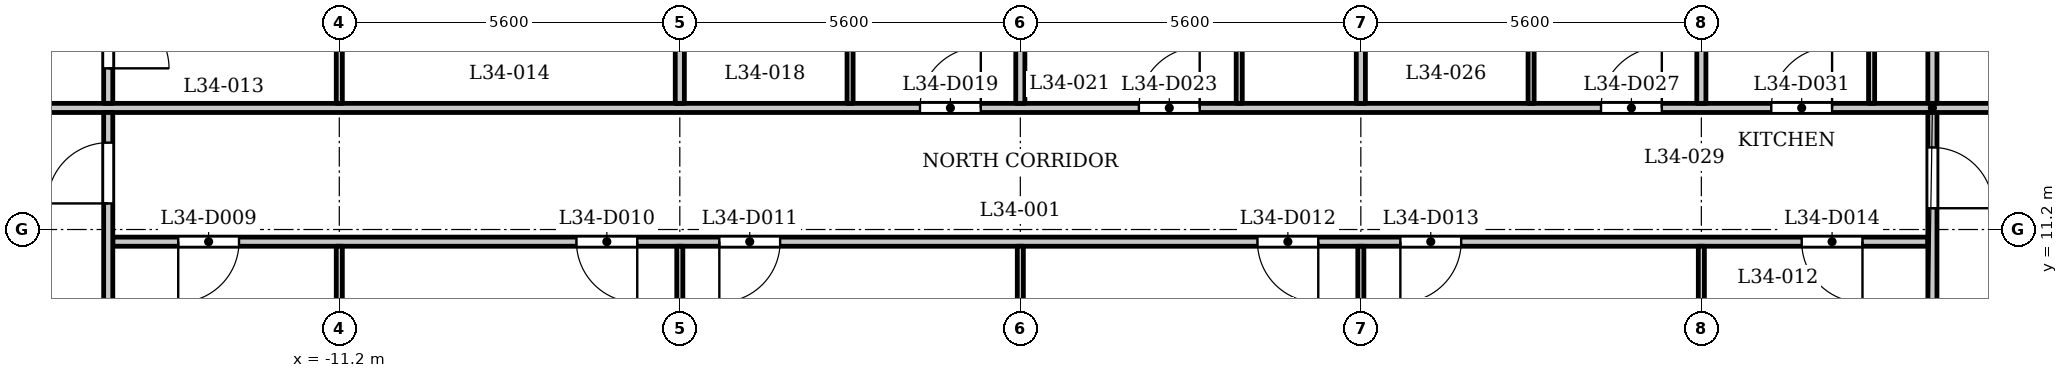
"""IFC4 building model, lengths in metres.
Left out: names, types, materials, properties, quantities, classifications, styles, units other than length and angle.
Written with IfcOpenShell. Run it as: python <this file> out.ifc"""

import sys

from ifc_helpers import new_model, si_unit, direction, frame, frame_2d, origin, place, context, subcontext, project, spatial, rectangle, extrude, element, fill, save


model = new_model("IFC4")
c1 = context("Model", 3, precision=1e-05, world=origin(), true_north=direction((0.0, 1.0)))
c2 = subcontext(c1, "Body", "Model", "MODEL_VIEW")
j1 = project(units=[si_unit("LENGTHUNIT", "METRE"), si_unit("PLANEANGLEUNIT", "RADIAN")], contexts=[c1])
p1 = place(None, origin())
s1 = spatial("IfcSite", under=j1, at=p1, CompositionType="ELEMENT")
p2 = place(p1, origin())
s2 = spatial("IfcBuilding", under=s1, at=p2, CompositionType="ELEMENT")
p3 = place(p2, frame((0.0, 0.0, 136.1)))
s3 = spatial("IfcBuildingStorey", under=s2, at=p3, CompositionType="ELEMENT", Elevation=136.1)
p4 = place(p3, frame((-14.925, 11.0, 0.0), z_axis=(0.0, 0.0, 1.0), x_axis=(1.0, 0.0, 0.0)))
e1 = element("IfcWall", 1, at=p4, inside=s3, PredefinedType="PARTITIONING", context=c2, shape_type="SweptSolid", body=[
    extrude(rectangle(XDim=29.85, YDim=0.15, at=frame_2d((14.925, 0.0))), origin(), (0.0, 0.0, 1.0), 3.2),
])
p5 = place(p4, frame((1.076, 0.0, 0.0)))
e2 = element("IfcOpeningElement", 2, at=p5, cuts=e1, PredefinedType="OPENING", context=c2, shape_type="SweptSolid", body=[
    extrude(rectangle(XDim=1.0, YDim=2.1, at=frame_2d((0.5, 1.05))), frame((0.0, 0.085, 0.0), z_axis=(0.0, -1.0, 0.0), x_axis=(1.0, 0.0, 0.0)), (0.0, 0.0, 1.0), 0.17),
])
p6 = place(p4, frame((7.625, 0.0, 0.0)))
e3 = element("IfcOpeningElement", 3, at=p6, cuts=e1, PredefinedType="OPENING", context=c2, shape_type="SweptSolid", body=[
    extrude(rectangle(XDim=1.0, YDim=2.1, at=frame_2d((0.5, 1.05))), frame((0.0, 0.085, 0.0), z_axis=(0.0, -1.0, 0.0), x_axis=(1.0, 0.0, 0.0)), (0.0, 0.0, 1.0), 0.17),
])
p7 = place(p4, frame((9.975, 0.0, 0.0)))
e4 = element("IfcOpeningElement", 4, at=p7, cuts=e1, PredefinedType="OPENING", context=c2, shape_type="SweptSolid", body=[
    extrude(rectangle(XDim=1.0, YDim=2.1, at=frame_2d((0.5, 1.05))), frame((0.0, 0.085, 0.0), z_axis=(0.0, -1.0, 0.0), x_axis=(1.0, 0.0, 0.0)), (0.0, 0.0, 1.0), 0.17),
])
p8 = place(p4, frame((18.825, 0.0, 0.0)))
e5 = element("IfcOpeningElement", 5, at=p8, cuts=e1, PredefinedType="OPENING", context=c2, shape_type="SweptSolid", body=[
    extrude(rectangle(XDim=1.0, YDim=2.1, at=frame_2d((0.5, 1.05))), frame((0.0, 0.085, 0.0), z_axis=(0.0, -1.0, 0.0), x_axis=(1.0, 0.0, 0.0)), (0.0, 0.0, 1.0), 0.17),
])
p9 = place(p4, frame((21.175, 0.0, 0.0)))
e6 = element("IfcOpeningElement", 6, at=p9, cuts=e1, PredefinedType="OPENING", context=c2, shape_type="SweptSolid", body=[
    extrude(rectangle(XDim=1.0, YDim=2.1, at=frame_2d((0.5, 1.05))), frame((0.0, 0.085, 0.0), z_axis=(0.0, -1.0, 0.0), x_axis=(1.0, 0.0, 0.0)), (0.0, 0.0, 1.0), 0.17),
])
p10 = place(p4, frame((27.775, 0.0, 0.0)))
e7 = element("IfcOpeningElement", 7, at=p10, cuts=e1, PredefinedType="OPENING", context=c2, shape_type="SweptSolid", body=[
    extrude(rectangle(XDim=1.0, YDim=2.1, at=frame_2d((0.5, 1.05))), frame((0.0, 0.085, 0.0), z_axis=(0.0, -1.0, 0.0), x_axis=(1.0, 0.0, 0.0)), (0.0, 0.0, 1.0), 0.17),
])
p11 = place(p3, frame((-17.4, 13.2, 0.0), z_axis=(0.0, 0.0, 1.0), x_axis=(1.0, 0.0, 0.0)))
e8 = element("IfcWall", 8, at=p11, inside=s3, PredefinedType="PARTITIONING", context=c2, shape_type="SweptSolid", body=[
    extrude(rectangle(XDim=34.8, YDim=0.15, at=frame_2d((17.4, 0.0))), origin(), (0.0, 0.0, 1.0), 3.2),
])
p12 = place(p11, frame((0.25, 0.0, 0.0)))
e9 = element("IfcOpeningElement", 9, at=p12, cuts=e8, PredefinedType="OPENING", context=c2, shape_type="SweptSolid", body=[
    extrude(rectangle(XDim=1.0, YDim=2.1, at=frame_2d((0.5, 1.05))), frame((0.0, 0.085, 0.0), z_axis=(0.0, -1.0, 0.0), x_axis=(1.0, 0.0, 0.0)), (0.0, 0.0, 1.0), 0.17),
])
p13 = place(p11, frame((33.65, 0.0, 0.0)))
e10 = element("IfcOpeningElement", 10, at=p13, cuts=e8, PredefinedType="OPENING", context=c2, shape_type="SweptSolid", body=[
    extrude(rectangle(XDim=1.0, YDim=2.1, at=frame_2d((0.5, 1.05))), frame((0.0, 0.085, 0.0), z_axis=(0.0, -1.0, 0.0), x_axis=(1.0, 0.0, 0.0)), (0.0, 0.0, 1.0), 0.17),
])
p14 = place(p11, frame((15.75, 0.0, 0.0)))
e11 = element("IfcOpeningElement", 11, at=p14, cuts=e8, PredefinedType="OPENING", context=c2, shape_type="SweptSolid", body=[
    extrude(rectangle(XDim=1.0, YDim=2.1, at=frame_2d((0.5, 1.05))), frame((0.0, 0.085, 0.0), z_axis=(0.0, -1.0, 0.0), x_axis=(1.0, 0.0, 0.0)), (0.0, 0.0, 1.0), 0.17),
])
p15 = place(p11, frame((19.35, 0.0, 0.0)))
e12 = element("IfcOpeningElement", 12, at=p15, cuts=e8, PredefinedType="OPENING", context=c2, shape_type="SweptSolid", body=[
    extrude(rectangle(XDim=1.0, YDim=2.1, at=frame_2d((0.5, 1.05))), frame((0.0, 0.085, 0.0), z_axis=(0.0, -1.0, 0.0), x_axis=(1.0, 0.0, 0.0)), (0.0, 0.0, 1.0), 0.17),
])
p16 = place(p11, frame((26.95, 0.0, 0.0)))
e13 = element("IfcOpeningElement", 13, at=p16, cuts=e8, PredefinedType="OPENING", context=c2, shape_type="SweptSolid", body=[
    extrude(rectangle(XDim=1.0, YDim=2.1, at=frame_2d((0.5, 1.05))), frame((0.0, 0.085, 0.0), z_axis=(0.0, -1.0, 0.0), x_axis=(1.0, 0.0, 0.0)), (0.0, 0.0, 1.0), 0.17),
])
p17 = place(p11, frame((29.75, 0.0, 0.0)))
e14 = element("IfcOpeningElement", 14, at=p17, cuts=e8, PredefinedType="OPENING", context=c2, shape_type="SweptSolid", body=[
    extrude(rectangle(XDim=1.0, YDim=2.1, at=frame_2d((0.5, 1.05))), frame((0.0, 0.085, 0.0), z_axis=(0.0, -1.0, 0.0), x_axis=(1.0, 0.0, 0.0)), (0.0, 0.0, 1.0), 0.17),
])
p18 = place(p3, frame((-15.0, 6.769, 0.0), z_axis=(0.0, 0.0, 1.0), x_axis=(0.0, 1.0, 0.0)))
e15 = element("IfcWall", 15, at=p18, inside=s3, PredefinedType="PARTITIONING", context=c2, shape_type="SweptSolid", body=[
    extrude(rectangle(XDim=6.356, YDim=0.15, at=frame_2d((3.178, 0.0))), origin(), (0.0, 0.0, 1.0), 3.2),
])
p19 = place(p18, frame((4.86, 0.0, 0.0)))
e16 = element("IfcOpeningElement", 16, at=p19, cuts=e15, PredefinedType="OPENING", context=c2, shape_type="SweptSolid", body=[
    extrude(rectangle(XDim=1.0, YDim=2.1, at=frame_2d((0.5, 1.05))), frame((0.0, 0.085, 0.0), z_axis=(0.0, -1.0, 0.0), x_axis=(1.0, 0.0, 0.0)), (0.0, 0.0, 1.0), 0.17),
])
p20 = place(p3, frame((-15.0, 13.275, 0.0), z_axis=(0.0, 0.0, 1.0), x_axis=(0.0, 1.0, 0.0)))
e17 = element("IfcWall", 17, at=p20, inside=s3, PredefinedType="PARTITIONING", context=c2, shape_type="SweptSolid", body=[
    extrude(rectangle(XDim=2.05, YDim=0.15, at=frame_2d((1.025, 0.0))), origin(), (0.0, 0.0, 1.0), 3.2),
])
p21 = place(p20, frame((0.576, 0.0, 0.0)))
e18 = element("IfcOpeningElement", 18, at=p21, cuts=e17, PredefinedType="OPENING", context=c2, shape_type="SweptSolid", body=[
    extrude(rectangle(XDim=1.0, YDim=2.1, at=frame_2d((0.5, 1.05))), frame((0.0, 0.085, 0.0), z_axis=(0.0, -1.0, 0.0), x_axis=(1.0, 0.0, 0.0)), (0.0, 0.0, 1.0), 0.17),
])
p22 = place(p3, frame((-11.2, 7.32, 0.0), z_axis=(0.0, 0.0, 1.0), x_axis=(0.0, 1.0, 0.0)))
e19 = element("IfcWall", 19, at=p22, inside=s3, PredefinedType="PARTITIONING", context=c2, shape_type="SweptSolid", body=[
    extrude(rectangle(XDim=3.605, YDim=0.1, at=frame_2d((1.802, 0.0))), origin(), (0.0, 0.0, 1.0), 3.2),
])
p23 = place(p3, frame((-11.2, 13.275, 0.0), z_axis=(0.0, 0.0, 1.0), x_axis=(0.0, 1.0, 0.0)))
e20 = element("IfcWall", 20, at=p23, inside=s3, PredefinedType="PARTITIONING", context=c2, shape_type="SweptSolid", body=[
    extrude(rectangle(XDim=3.175, YDim=0.1, at=frame_2d((1.587, 0.0))), origin(), (0.0, 0.0, 1.0), 3.2),
])
p24 = place(p3, frame((-5.6, 7.32, 0.0), z_axis=(0.0, 0.0, 1.0), x_axis=(0.0, 1.0, 0.0)))
e21 = element("IfcWall", 21, at=p24, inside=s3, PredefinedType="PARTITIONING", context=c2, shape_type="SweptSolid", body=[
    extrude(rectangle(XDim=3.605, YDim=0.1, at=frame_2d((1.802, 0.0))), origin(), (0.0, 0.0, 1.0), 3.2),
])
p25 = place(p3, frame((-5.6, 13.275, 0.0), z_axis=(0.0, 0.0, 1.0), x_axis=(0.0, 1.0, 0.0)))
e22 = element("IfcWall", 22, at=p25, inside=s3, PredefinedType="PARTITIONING", context=c2, shape_type="SweptSolid", body=[
    extrude(rectangle(XDim=3.175, YDim=0.15, at=frame_2d((1.587, 0.0))), origin(), (0.0, 0.0, 1.0), 3.2),
])
p26 = place(p3, frame((-2.8, 13.275, 0.0), z_axis=(0.0, 0.0, 1.0), x_axis=(0.0, 1.0, 0.0)))
e23 = element("IfcWall", 23, at=p26, inside=s3, PredefinedType="PARTITIONING", context=c2, shape_type="SweptSolid", body=[
    extrude(rectangle(XDim=3.175, YDim=0.1, at=frame_2d((1.587, 0.0))), origin(), (0.0, 0.0, 1.0), 3.2),
])
p27 = place(p3, frame((0.0, 7.32, 0.0), z_axis=(0.0, 0.0, 1.0), x_axis=(0.0, 1.0, 0.0)))
e24 = element("IfcWall", 24, at=p27, inside=s3, PredefinedType="PARTITIONING", context=c2, shape_type="SweptSolid", body=[
    extrude(rectangle(XDim=3.605, YDim=0.1, at=frame_2d((1.802, 0.0))), origin(), (0.0, 0.0, 1.0), 3.2),
])
p28 = place(p3, frame((0.0, 13.275, 0.0), z_axis=(0.0, 0.0, 1.0), x_axis=(0.0, 1.0, 0.0)))
e25 = element("IfcWall", 25, at=p28, inside=s3, PredefinedType="PARTITIONING", context=c2, shape_type="SweptSolid", body=[
    extrude(rectangle(XDim=3.175, YDim=0.15, at=frame_2d((1.587, 0.0))), origin(), (0.0, 0.0, 1.0), 3.2),
])
p29 = place(p3, frame((3.6, 13.275, 0.0), z_axis=(0.0, 0.0, 1.0), x_axis=(0.0, 1.0, 0.0)))
e26 = element("IfcWall", 26, at=p29, inside=s3, PredefinedType="PARTITIONING", context=c2, shape_type="SweptSolid", body=[
    extrude(rectangle(XDim=3.175, YDim=0.1, at=frame_2d((1.587, 0.0))), origin(), (0.0, 0.0, 1.0), 3.2),
])
p30 = place(p3, frame((5.6, 7.32, 0.0), z_axis=(0.0, 0.0, 1.0), x_axis=(0.0, 1.0, 0.0)))
e27 = element("IfcWall", 27, at=p30, inside=s3, PredefinedType="PARTITIONING", context=c2, shape_type="SweptSolid", body=[
    extrude(rectangle(XDim=3.605, YDim=0.1, at=frame_2d((1.802, 0.0))), origin(), (0.0, 0.0, 1.0), 3.2),
])
p31 = place(p3, frame((5.6, 13.275, 0.0), z_axis=(0.0, 0.0, 1.0), x_axis=(0.0, 1.0, 0.0)))
e28 = element("IfcWall", 28, at=p31, inside=s3, PredefinedType="PARTITIONING", context=c2, shape_type="SweptSolid", body=[
    extrude(rectangle(XDim=3.175, YDim=0.15, at=frame_2d((1.587, 0.0))), origin(), (0.0, 0.0, 1.0), 3.2),
])
p32 = place(p3, frame((8.4, 13.275, 0.0), z_axis=(0.0, 0.0, 1.0), x_axis=(0.0, 1.0, 0.0)))
e29 = element("IfcWall", 29, at=p32, inside=s3, PredefinedType="PARTITIONING", context=c2, shape_type="SweptSolid", body=[
    extrude(rectangle(XDim=3.175, YDim=0.1, at=frame_2d((1.587, 0.0))), origin(), (0.0, 0.0, 1.0), 3.2),
])
p33 = place(p3, frame((11.2, 7.32, 0.0), z_axis=(0.0, 0.0, 1.0), x_axis=(0.0, 1.0, 0.0)))
e30 = element("IfcWall", 30, at=p33, inside=s3, PredefinedType="PARTITIONING", context=c2, shape_type="SweptSolid", body=[
    extrude(rectangle(XDim=3.605, YDim=0.1, at=frame_2d((1.802, 0.0))), origin(), (0.0, 0.0, 1.0), 3.2),
])
p34 = place(p3, frame((11.2, 13.275, 0.0), z_axis=(0.0, 0.0, 1.0), x_axis=(0.0, 1.0, 0.0)))
e31 = element("IfcWall", 31, at=p34, inside=s3, PredefinedType="PARTITIONING", context=c2, shape_type="SweptSolid", body=[
    extrude(rectangle(XDim=3.175, YDim=0.15, at=frame_2d((1.587, 0.0))), origin(), (0.0, 0.0, 1.0), 3.2),
])
p35 = place(p3, frame((14.0, 13.275, 0.0), z_axis=(0.0, 0.0, 1.0), x_axis=(0.0, 1.0, 0.0)))
e32 = element("IfcWall", 32, at=p35, inside=s3, PredefinedType="PARTITIONING", context=c2, shape_type="SweptSolid", body=[
    extrude(rectangle(XDim=3.175, YDim=0.1, at=frame_2d((1.587, 0.0))), origin(), (0.0, 0.0, 1.0), 3.2),
])
p36 = place(p3, frame((15.0, 6.769, 0.0), z_axis=(0.0, 0.0, 1.0), x_axis=(0.0, 1.0, 0.0)))
e33 = element("IfcWall", 33, at=p36, inside=s3, PredefinedType="PARTITIONING", context=c2, shape_type="SweptSolid", body=[
    extrude(rectangle(XDim=6.356, YDim=0.15, at=frame_2d((3.178, 0.0))), origin(), (0.0, 0.0, 1.0), 3.2),
])
p37 = place(p36, frame((4.781, 0.0, 0.0)))
e34 = element("IfcOpeningElement", 34, at=p37, cuts=e33, PredefinedType="OPENING", context=c2, shape_type="SweptSolid", body=[
    extrude(rectangle(XDim=1.0, YDim=2.1, at=frame_2d((0.5, 1.05))), frame((0.0, 0.085, 0.0), z_axis=(0.0, -1.0, 0.0), x_axis=(1.0, 0.0, 0.0)), (0.0, 0.0, 1.0), 0.17),
])
p38 = place(p3, frame((15.0, 13.275, 0.0), z_axis=(0.0, 0.0, 1.0), x_axis=(0.0, 1.0, 0.0)))
e35 = element("IfcWall", 35, at=p38, inside=s3, PredefinedType="PARTITIONING", context=c2, shape_type="SweptSolid", body=[
    extrude(rectangle(XDim=2.05, YDim=0.15, at=frame_2d((1.025, 0.0))), origin(), (0.0, 0.0, 1.0), 3.2),
])
p39 = place(p19, origin())
e36 = element("IfcDoor", 36, at=p39, inside=s3, OperationType="SINGLE_SWING_RIGHT", PredefinedType="DOOR", context=c2, shape_type="SweptSolid", body=[
    extrude(rectangle(XDim=1.0, YDim=2.1, at=frame_2d((0.5, 1.05))), frame((0.0, 0.025, 0.0), z_axis=(0.0, -1.0, 0.0), x_axis=(1.0, 0.0, 0.0)), (0.0, 0.0, 1.0), 0.05),
])
fill(e16, e36)
p40 = place(p37, origin())
e37 = element("IfcDoor", 37, at=p40, inside=s3, OperationType="SINGLE_SWING_LEFT", PredefinedType="DOOR", context=c2, shape_type="SweptSolid", body=[
    extrude(rectangle(XDim=1.0, YDim=2.1, at=frame_2d((0.5, 1.05))), frame((0.0, 0.025, 0.0), z_axis=(0.0, -1.0, 0.0), x_axis=(1.0, 0.0, 0.0)), (0.0, 0.0, 1.0), 0.05),
])
fill(e34, e37)
p41 = place(p5, origin())
e38 = element("IfcDoor", 38, at=p41, inside=s3, OperationType="SINGLE_SWING_LEFT", PredefinedType="DOOR", context=c2, shape_type="SweptSolid", body=[
    extrude(rectangle(XDim=1.0, YDim=2.1, at=frame_2d((0.5, 1.05))), frame((0.0, 0.025, 0.0), z_axis=(0.0, -1.0, 0.0), x_axis=(1.0, 0.0, 0.0)), (0.0, 0.0, 1.0), 0.05),
])
fill(e2, e38)
p42 = place(p6, origin())
e39 = element("IfcDoor", 39, at=p42, inside=s3, OperationType="SINGLE_SWING_RIGHT", PredefinedType="DOOR", context=c2, shape_type="SweptSolid", body=[
    extrude(rectangle(XDim=1.0, YDim=2.1, at=frame_2d((0.5, 1.05))), frame((0.0, 0.025, 0.0), z_axis=(0.0, -1.0, 0.0), x_axis=(1.0, 0.0, 0.0)), (0.0, 0.0, 1.0), 0.05),
])
fill(e3, e39)
p43 = place(p7, origin())
e40 = element("IfcDoor", 40, at=p43, inside=s3, OperationType="SINGLE_SWING_LEFT", PredefinedType="DOOR", context=c2, shape_type="SweptSolid", body=[
    extrude(rectangle(XDim=1.0, YDim=2.1, at=frame_2d((0.5, 1.05))), frame((0.0, 0.025, 0.0), z_axis=(0.0, -1.0, 0.0), x_axis=(1.0, 0.0, 0.0)), (0.0, 0.0, 1.0), 0.05),
])
fill(e4, e40)
p44 = place(p8, origin())
e41 = element("IfcDoor", 41, at=p44, inside=s3, OperationType="SINGLE_SWING_RIGHT", PredefinedType="DOOR", context=c2, shape_type="SweptSolid", body=[
    extrude(rectangle(XDim=1.0, YDim=2.1, at=frame_2d((0.5, 1.05))), frame((0.0, 0.025, 0.0), z_axis=(0.0, -1.0, 0.0), x_axis=(1.0, 0.0, 0.0)), (0.0, 0.0, 1.0), 0.05),
])
fill(e5, e41)
p45 = place(p9, origin())
e42 = element("IfcDoor", 42, at=p45, inside=s3, OperationType="SINGLE_SWING_LEFT", PredefinedType="DOOR", context=c2, shape_type="SweptSolid", body=[
    extrude(rectangle(XDim=1.0, YDim=2.1, at=frame_2d((0.5, 1.05))), frame((0.0, 0.025, 0.0), z_axis=(0.0, -1.0, 0.0), x_axis=(1.0, 0.0, 0.0)), (0.0, 0.0, 1.0), 0.05),
])
fill(e6, e42)
p46 = place(p10, origin())
e43 = element("IfcDoor", 43, at=p46, inside=s3, OperationType="SINGLE_SWING_RIGHT", PredefinedType="DOOR", context=c2, shape_type="SweptSolid", body=[
    extrude(rectangle(XDim=1.0, YDim=2.1, at=frame_2d((0.5, 1.05))), frame((0.0, 0.025, 0.0), z_axis=(0.0, -1.0, 0.0), x_axis=(1.0, 0.0, 0.0)), (0.0, 0.0, 1.0), 0.05),
])
fill(e7, e43)
p47 = place(p21, origin())
e44 = element("IfcDoor", 44, at=p47, inside=s3, OperationType="SINGLE_SWING_LEFT", PredefinedType="DOOR", context=c2, shape_type="SweptSolid", body=[
    extrude(rectangle(XDim=1.0, YDim=2.1, at=frame_2d((0.5, 1.05))), frame((0.0, 0.025, 0.0), z_axis=(0.0, -1.0, 0.0), x_axis=(1.0, 0.0, 0.0)), (0.0, 0.0, 1.0), 0.05),
])
fill(e18, e44)
p48 = place(p14, origin())
e45 = element("IfcDoor", 45, at=p48, inside=s3, OperationType="SINGLE_SWING_LEFT", PredefinedType="DOOR", context=c2, shape_type="SweptSolid", body=[
    extrude(rectangle(XDim=1.0, YDim=2.1, at=frame_2d((0.5, 1.05))), frame((0.0, 0.025, 0.0), z_axis=(0.0, -1.0, 0.0), x_axis=(1.0, 0.0, 0.0)), (0.0, 0.0, 1.0), 0.05),
])
fill(e11, e45)
p49 = place(p15, origin())
e46 = element("IfcDoor", 46, at=p49, inside=s3, OperationType="SINGLE_SWING_LEFT", PredefinedType="DOOR", context=c2, shape_type="SweptSolid", body=[
    extrude(rectangle(XDim=1.0, YDim=2.1, at=frame_2d((0.5, 1.05))), frame((0.0, 0.025, 0.0), z_axis=(0.0, -1.0, 0.0), x_axis=(1.0, 0.0, 0.0)), (0.0, 0.0, 1.0), 0.05),
])
fill(e12, e46)
p50 = place(p16, origin())
e47 = element("IfcDoor", 47, at=p50, inside=s3, OperationType="SINGLE_SWING_LEFT", PredefinedType="DOOR", context=c2, shape_type="SweptSolid", body=[
    extrude(rectangle(XDim=1.0, YDim=2.1, at=frame_2d((0.5, 1.05))), frame((0.0, 0.025, 0.0), z_axis=(0.0, -1.0, 0.0), x_axis=(1.0, 0.0, 0.0)), (0.0, 0.0, 1.0), 0.05),
])
fill(e13, e47)
p51 = place(p17, origin())
e48 = element("IfcDoor", 48, at=p51, inside=s3, OperationType="SINGLE_SWING_LEFT", PredefinedType="DOOR", context=c2, shape_type="SweptSolid", body=[
    extrude(rectangle(XDim=1.0, YDim=2.1, at=frame_2d((0.5, 1.05))), frame((0.0, 0.025, 0.0), z_axis=(0.0, -1.0, 0.0), x_axis=(1.0, 0.0, 0.0)), (0.0, 0.0, 1.0), 0.05),
])
fill(e14, e48)
save(model, sys.argv[1])
